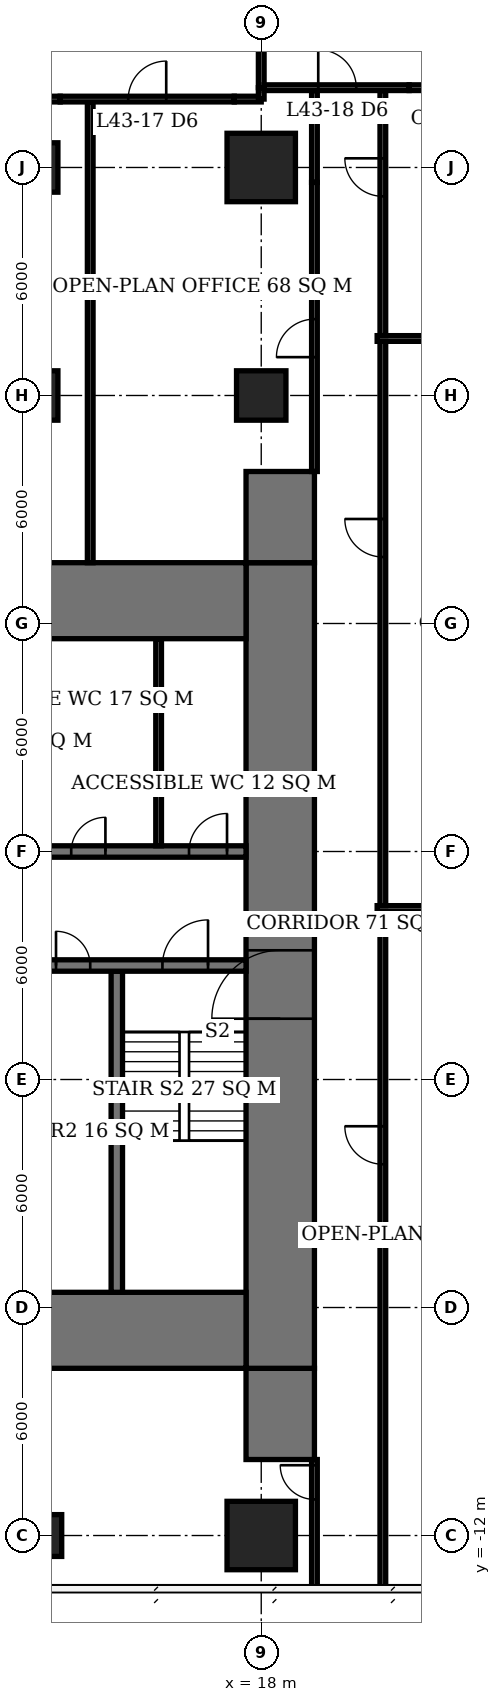
"""IFC4 building model, lengths in metres.
Left out: names, types, materials, properties, quantities, classifications, styles, units other than length and angle.
Written with IfcOpenShell. Run it as: python <this file> out.ifc"""

import sys

from ifc_helpers import new_model, si_unit, direction, frame, frame_2d, origin, origin_2d, place, context, subcontext, project, spatial, rectangle, extrude, element, fill, save


model = new_model("IFC4")
c1 = context("Model", 3, precision=1e-05, world=origin(), true_north=direction((0.0, 1.0)))
c2 = subcontext(c1, "Body", "Model", "MODEL_VIEW")
j1 = project(units=[si_unit("LENGTHUNIT", "METRE"), si_unit("PLANEANGLEUNIT", "RADIAN")], contexts=[c1])
p1 = place(None, origin())
s1 = spatial("IfcSite", under=j1, at=p1, CompositionType="ELEMENT")
p2 = place(p1, origin())
s2 = spatial("IfcBuilding", under=s1, at=p2, CompositionType="ELEMENT")
p3 = place(p2, frame((0.0, 0.0, 177.2)))
s3 = spatial("IfcBuildingStorey", under=s2, at=p3, CompositionType="ELEMENT", Elevation=177.2)
p4 = place(p3, frame((12.0, -12.0, 0.0), z_axis=(0.0, 0.0, 1.0), x_axis=(1.0, 0.0, 0.0)))
e1 = element("IfcColumn", 1, at=p4, inside=s3, PredefinedType="COLUMN", context=c2, shape_type="SweptSolid", body=[
    extrude(rectangle(XDim=1.5, YDim=1.1, at=origin_2d()), origin(), (0.0, 0.0, 1.0), 3.9),
])
for number, where, z_axis, x_axis in (
    (2, (12.0, 18.0, 0.0), (0.0, 0.0, 1.0), (1.0, 0.0, 0.0)),
    (3, (12.0, 24.0, 0.0), (0.0, 0.0, 1.0), (1.0, 0.0, 0.0)),
):
    element("IfcColumn", number, at=place(p3, frame(where, z_axis=z_axis, x_axis=x_axis)), inside=s3, PredefinedType="COLUMN", context=c2, shape_type="SweptSolid", body=[
        extrude(rectangle(XDim=1.3, YDim=1.3, at=origin_2d()), origin(), (0.0, 0.0, 1.0), 3.9),
    ])
p5 = place(p3, frame((18.0, -12.0, 0.0), z_axis=(0.0, 0.0, 1.0), x_axis=(1.0, 0.0, 0.0)))
e4 = element("IfcColumn", 4, at=p5, inside=s3, PredefinedType="COLUMN", context=c2, shape_type="SweptSolid", body=[
    extrude(rectangle(XDim=1.8, YDim=1.8, at=origin_2d()), origin(), (0.0, 0.0, 1.0), 3.9),
])
p6 = place(p3, frame((18.0, 18.0, 0.0), z_axis=(0.0, 0.0, 1.0), x_axis=(1.0, 0.0, 0.0)))
e5 = element("IfcColumn", 5, at=p6, inside=s3, PredefinedType="COLUMN", context=c2, shape_type="SweptSolid", body=[
    extrude(rectangle(XDim=1.3, YDim=1.3, at=origin_2d()), origin(), (0.0, 0.0, 1.0), 3.9),
])
p7 = place(p3, frame((18.0, 24.0, 0.0), z_axis=(0.0, 0.0, 1.0), x_axis=(1.0, 0.0, 0.0)))
e6 = element("IfcColumn", 6, at=p7, inside=s3, PredefinedType="COLUMN", context=c2, shape_type="SweptSolid", body=[
    extrude(rectangle(XDim=1.8, YDim=1.8, at=origin_2d()), origin(), (0.0, 0.0, 1.0), 3.9),
])
for number, where, z_axis, x_axis in (
    (7, (-5.6, -6.6, 0.0), (0.0, 0.0, 1.0), (1.0, 0.0, 0.0)),
    (8, (-5.6, 12.6, 0.0), (0.0, 0.0, 1.0), (1.0, 0.0, 0.0)),
):
    element("IfcWall", number, at=place(p3, frame(where, z_axis=z_axis, x_axis=x_axis)), inside=s3, PredefinedType="SHEAR", context=c2, shape_type="SweptSolid", body=[
        extrude(rectangle(XDim=23.2, YDim=2.0, at=frame_2d((11.6, 0.0))), origin(), (0.0, 0.0, 1.0), 3.9),
    ])
p8 = place(p3, frame((18.5, -7.6, 0.0), z_axis=(0.0, 0.0, 1.0), x_axis=(0.0, 1.0, 0.0)))
e9 = element("IfcWall", 9, at=p8, inside=s3, PredefinedType="SHEAR", context=c2, shape_type="SweptSolid", body=[
    extrude(rectangle(XDim=21.2, YDim=1.8, at=frame_2d((10.6, 0.0))), origin(), (0.0, 0.0, 1.0), 3.9),
])
p9 = place(p8, frame((9.2, 0.0, 0.0)))
e10 = element("IfcOpeningElement", 10, at=p9, cuts=e9, PredefinedType="OPENING", context=c2, shape_type="SweptSolid", body=[
    extrude(rectangle(XDim=1.8, YDim=2.4, at=frame_2d((0.9, 1.2))), frame((0.0, 0.91, 0.0), z_axis=(0.0, -1.0, 0.0), x_axis=(1.0, 0.0, 0.0)), (0.0, 0.0, 1.0), 1.82),
])
for number, where, z_axis, x_axis in (
    (11, (18.5, -10.0, 0.0), (0.0, 0.0, 1.0), (0.0, 1.0, 0.0)),
    (12, (18.5, 13.6, 0.0), (0.0, 0.0, 1.0), (0.0, 1.0, 0.0)),
):
    element("IfcWall", number, at=place(p3, frame(where, z_axis=z_axis, x_axis=x_axis)), inside=s3, PredefinedType="SHEAR", context=c2, shape_type="SweptSolid", body=[
        extrude(rectangle(XDim=2.4, YDim=1.8, at=frame_2d((1.2, 0.0))), origin(), (0.0, 0.0, 1.0), 3.9),
    ])
p10 = place(p3, frame((12.15, 3.0, 0.0), z_axis=(0.0, 0.0, 1.0), x_axis=(1.0, 0.0, 0.0)))
e13 = element("IfcWall", 13, at=p10, inside=s3, PredefinedType="SHEAR", context=c2, shape_type="SweptSolid", body=[
    extrude(rectangle(XDim=5.45, YDim=0.3, at=frame_2d((2.725, 0.0))), origin(), (0.0, 0.0, 1.0), 3.9),
])
p11 = place(p10, frame((3.25, 0.0, 0.0)))
e14 = element("IfcOpeningElement", 14, at=p11, cuts=e13, PredefinedType="OPENING", context=c2, shape_type="SweptSolid", body=[
    extrude(rectangle(XDim=1.2, YDim=2.1, at=frame_2d((0.6, 1.05))), frame((0.0, 0.16, 0.0), z_axis=(0.0, -1.0, 0.0), x_axis=(1.0, 0.0, 0.0)), (0.0, 0.0, 1.0), 0.32),
])
p12 = place(p10, frame((0.45, 0.0, 0.0)))
e15 = element("IfcOpeningElement", 15, at=p12, cuts=e13, PredefinedType="OPENING", context=c2, shape_type="SweptSolid", body=[
    extrude(rectangle(XDim=0.9, YDim=2.1, at=frame_2d((0.45, 1.05))), frame((0.0, 0.16, 0.0), z_axis=(0.0, -1.0, 0.0), x_axis=(1.0, 0.0, 0.0)), (0.0, 0.0, 1.0), 0.32),
])
p13 = place(p3, frame((-0.15, 6.0, 0.0), z_axis=(0.0, 0.0, 1.0), x_axis=(1.0, 0.0, 0.0)))
e16 = element("IfcWall", 16, at=p13, inside=s3, PredefinedType="SHEAR", context=c2, shape_type="SweptSolid", body=[
    extrude(rectangle(XDim=17.75, YDim=0.3, at=frame_2d((8.875, 0.0))), origin(), (0.0, 0.0, 1.0), 3.9),
])
p14 = place(p13, frame((13.15, 0.0, 0.0)))
e17 = element("IfcOpeningElement", 17, at=p14, cuts=e16, PredefinedType="OPENING", context=c2, shape_type="SweptSolid", body=[
    extrude(rectangle(XDim=0.9, YDim=2.1, at=frame_2d((0.45, 1.05))), frame((0.0, 0.16, 0.0), z_axis=(0.0, -1.0, 0.0), x_axis=(1.0, 0.0, 0.0)), (0.0, 0.0, 1.0), 0.32),
])
p15 = place(p13, frame((16.25, 0.0, 0.0)))
e18 = element("IfcOpeningElement", 18, at=p15, cuts=e16, PredefinedType="OPENING", context=c2, shape_type="SweptSolid", body=[
    extrude(rectangle(XDim=1.0, YDim=2.1, at=frame_2d((0.5, 1.05))), frame((0.0, 0.16, 0.0), z_axis=(0.0, -1.0, 0.0), x_axis=(1.0, 0.0, 0.0)), (0.0, 0.0, 1.0), 0.32),
])
p16 = place(p13, frame((7.25, 0.0, 0.0)))
e19 = element("IfcOpeningElement", 19, at=p16, cuts=e16, PredefinedType="OPENING", context=c2, shape_type="SweptSolid", body=[
    extrude(rectangle(XDim=1.0, YDim=2.1, at=frame_2d((0.5, 1.05))), frame((0.0, 0.16, 0.0), z_axis=(0.0, -1.0, 0.0), x_axis=(1.0, 0.0, 0.0)), (0.0, 0.0, 1.0), 0.32),
])
p17 = place(p13, frame((1.1, 0.0, 0.0)))
e20 = element("IfcOpeningElement", 20, at=p17, cuts=e16, PredefinedType="OPENING", context=c2, shape_type="SweptSolid", body=[
    extrude(rectangle(XDim=1.1, YDim=2.1, at=frame_2d((0.55, 1.05))), frame((0.0, 0.16, 0.0), z_axis=(0.0, -1.0, 0.0), x_axis=(1.0, 0.0, 0.0)), (0.0, 0.0, 1.0), 0.32),
])
p18 = place(p13, frame((4.1, 0.0, 0.0)))
e21 = element("IfcOpeningElement", 21, at=p18, cuts=e16, PredefinedType="OPENING", context=c2, shape_type="SweptSolid", body=[
    extrude(rectangle(XDim=1.1, YDim=2.1, at=frame_2d((0.55, 1.05))), frame((0.0, 0.16, 0.0), z_axis=(0.0, -1.0, 0.0), x_axis=(1.0, 0.0, 0.0)), (0.0, 0.0, 1.0), 0.32),
])
p19 = place(p3, frame((14.2, -5.6, 0.0), z_axis=(0.0, 0.0, 1.0), x_axis=(0.0, 1.0, 0.0)))
e22 = element("IfcWall", 22, at=p19, inside=s3, PredefinedType="SHEAR", context=c2, shape_type="SweptSolid", body=[
    extrude(rectangle(XDim=8.45, YDim=0.3, at=frame_2d((4.225, 0.0))), origin(), (0.0, 0.0, 1.0), 3.9),
])
p20 = place(p3, frame((15.3, 6.15, 0.0), z_axis=(0.0, 0.0, 1.0), x_axis=(0.0, 1.0, 0.0)))
e23 = element("IfcWall", 23, at=p20, inside=s3, PredefinedType="PLUMBINGWALL", context=c2, shape_type="SweptSolid", body=[
    extrude(rectangle(XDim=5.45, YDim=0.15, at=frame_2d((2.725, 0.0))), origin(), (0.0, 0.0, 1.0), 3.65),
])
p21 = place(p3, frame((12.0, 25.8, 0.0), z_axis=(0.0, 0.0, 1.0), x_axis=(1.0, 0.0, 0.0)))
e24 = element("IfcWall", 24, at=p21, inside=s3, PredefinedType="PARTITIONING", context=c2, shape_type="SweptSolid", body=[
    extrude(rectangle(XDim=0.71, YDim=0.15, at=frame_2d((0.355, 0.0))), origin(), (0.0, 0.0, 1.0), 2.65),
])
p22 = place(p3, frame((12.71, 25.8, 0.0), z_axis=(0.0, 0.0, 1.0), x_axis=(1.0, 0.0, 0.0)))
e25 = element("IfcWall", 25, at=p22, inside=s3, PredefinedType="PARTITIONING", context=c2, shape_type="SweptSolid", body=[
    extrude(rectangle(XDim=4.58, YDim=0.15, at=frame_2d((2.29, 0.0))), origin(), (0.0, 0.0, 1.0), 3.65),
])
p23 = place(p22, frame((1.79, 0.0, 0.0)))
e26 = element("IfcOpeningElement", 26, at=p23, cuts=e25, PredefinedType="OPENING", context=c2, shape_type="SweptSolid", body=[
    extrude(rectangle(XDim=1.0, YDim=2.1, at=frame_2d((0.5, 1.05))), frame((0.0, 0.085, 0.0), z_axis=(0.0, -1.0, 0.0), x_axis=(1.0, 0.0, 0.0)), (0.0, 0.0, 1.0), 0.17),
])
p24 = place(p3, frame((17.29, 25.8, 0.0), z_axis=(0.0, 0.0, 1.0), x_axis=(1.0, 0.0, 0.0)))
e27 = element("IfcWall", 27, at=p24, inside=s3, PredefinedType="PARTITIONING", context=c2, shape_type="SweptSolid", body=[
    extrude(rectangle(XDim=0.71, YDim=0.15, at=frame_2d((0.355, 0.0))), origin(), (0.0, 0.0, 1.0), 2.65),
])
p25 = place(p3, frame((18.075, 26.1, 0.0), z_axis=(0.0, 0.0, 1.0), x_axis=(1.0, 0.0, 0.0)))
e28 = element("IfcWall", 28, at=p25, inside=s3, PredefinedType="PARTITIONING", context=c2, shape_type="SweptSolid", body=[
    extrude(rectangle(XDim=3.817, YDim=0.15, at=frame_2d((1.909, 0.0))), origin(), (0.0, 0.0, 1.0), 2.65),
])
p26 = place(p25, frame((1.425, 0.0, 0.0)))
e29 = element("IfcOpeningElement", 29, at=p26, cuts=e28, PredefinedType="OPENING", context=c2, shape_type="SweptSolid", body=[
    extrude(rectangle(XDim=1.0, YDim=2.1, at=frame_2d((0.5, 1.05))), frame((0.0, 0.085, 0.0), z_axis=(0.0, -1.0, 0.0), x_axis=(1.0, 0.0, 0.0)), (0.0, 0.0, 1.0), 0.17),
])
p27 = place(p3, frame((21.892, 26.1, 0.0), z_axis=(0.0, 0.0, 1.0), x_axis=(1.0, 0.0, 0.0)))
e30 = element("IfcWall", 30, at=p27, inside=s3, PredefinedType="PARTITIONING", context=c2, shape_type="SweptSolid", body=[
    extrude(rectangle(XDim=1.318, YDim=0.15, at=frame_2d((0.659, 0.0))), origin(), (0.0, 0.0, 1.0), 3.65),
])
p28 = place(p3, frame((18.0, 25.8, 0.0), z_axis=(0.0, 0.0, 1.0), x_axis=(0.0, 1.0, 0.0)))
e31 = element("IfcWall", 31, at=p28, inside=s3, PredefinedType="PARTITIONING", context=c2, shape_type="SweptSolid", body=[
    extrude(rectangle(XDim=0.3, YDim=0.15, at=frame_2d((0.15, 0.0))), origin(), (0.0, 0.0, 1.0), 2.65),
])
p29 = place(p3, frame((18.0, 26.1, 0.0), z_axis=(0.0, 0.0, 1.0), x_axis=(0.0, 1.0, 0.0)))
e32 = element("IfcWall", 32, at=p29, inside=s3, PredefinedType="PARTITIONING", context=c2, shape_type="SweptSolid", body=[
    extrude(rectangle(XDim=2.21, YDim=0.15, at=frame_2d((1.105, 0.0))), origin(), (0.0, 0.0, 1.0), 2.65),
])
p30 = place(p3, frame((13.5, 13.6, 0.0), z_axis=(0.0, 0.0, 1.0), x_axis=(0.0, 1.0, 0.0)))
e33 = element("IfcWall", 33, at=p30, inside=s3, PredefinedType="PARTITIONING", context=c2, shape_type="SweptSolid", body=[
    extrude(rectangle(XDim=12.125, YDim=0.15, at=frame_2d((6.062, 0.0))), origin(), (0.0, 0.0, 1.0), 3.65),
])
p31 = place(p3, frame((19.4, -13.4, 0.0), z_axis=(0.0, 0.0, 1.0), x_axis=(0.0, 1.0, 0.0)))
e34 = element("IfcWall", 34, at=p31, inside=s3, PredefinedType="PARTITIONING", context=c2, shape_type="SweptSolid", body=[
    extrude(rectangle(XDim=3.4, YDim=0.15, at=frame_2d((1.7, 0.0))), origin(), (0.0, 0.0, 1.0), 3.65),
])
p32 = place(p31, frame((2.35, 0.0, 0.0)))
e35 = element("IfcOpeningElement", 35, at=p32, cuts=e34, PredefinedType="OPENING", context=c2, shape_type="SweptSolid", body=[
    extrude(rectangle(XDim=0.9, YDim=2.1, at=frame_2d((0.45, 1.05))), frame((0.0, 0.085, 0.0), z_axis=(0.0, -1.0, 0.0), x_axis=(1.0, 0.0, 0.0)), (0.0, 0.0, 1.0), 0.17),
])
p33 = place(p3, frame((19.4, 16.0, 0.0), z_axis=(0.0, 0.0, 1.0), x_axis=(0.0, 1.0, 0.0)))
e36 = element("IfcWall", 36, at=p33, inside=s3, PredefinedType="PARTITIONING", context=c2, shape_type="SweptSolid", body=[
    extrude(rectangle(XDim=7.608, YDim=0.15, at=frame_2d((3.804, 0.0))), origin(), (0.0, 0.0, 1.0), 3.65),
])
p34 = place(p33, frame((3.009, 0.0, 0.0)))
e37 = element("IfcOpeningElement", 37, at=p34, cuts=e36, PredefinedType="OPENING", context=c2, shape_type="SweptSolid", body=[
    extrude(rectangle(XDim=1.0, YDim=2.1, at=frame_2d((0.5, 1.05))), frame((0.0, 0.085, 0.0), z_axis=(0.0, -1.0, 0.0), x_axis=(1.0, 0.0, 0.0)), (0.0, 0.0, 1.0), 0.17),
])
p35 = place(p3, frame((19.4, 23.608, 0.0), z_axis=(0.0, 0.0, 1.0), x_axis=(0.0, 1.0, 0.0)))
e38 = element("IfcWall", 38, at=p35, inside=s3, PredefinedType="PARTITIONING", context=c2, shape_type="SweptSolid", body=[
    extrude(rectangle(XDim=2.417, YDim=0.15, at=frame_2d((1.208, 0.0))), origin(), (0.0, 0.0, 1.0), 2.65),
])
p36 = place(p3, frame((21.2, -13.4, 0.0), z_axis=(0.0, 0.0, 1.0), x_axis=(0.0, 1.0, 0.0)))
e39 = element("IfcWall", 39, at=p36, inside=s3, PredefinedType="PARTITIONING", context=c2, shape_type="SweptSolid", body=[
    extrude(rectangle(XDim=17.825, YDim=0.15, at=frame_2d((8.913, 0.0))), origin(), (0.0, 0.0, 1.0), 3.65),
])
p37 = place(p36, frame((11.17, 0.0, 0.0)))
e40 = element("IfcOpeningElement", 40, at=p37, cuts=e39, PredefinedType="OPENING", context=c2, shape_type="SweptSolid", body=[
    extrude(rectangle(XDim=1.0, YDim=2.1, at=frame_2d((0.5, 1.05))), frame((0.0, 0.085, 0.0), z_axis=(0.0, -1.0, 0.0), x_axis=(1.0, 0.0, 0.0)), (0.0, 0.0, 1.0), 0.17),
])
p38 = place(p3, frame((21.2, 4.575, 0.0), z_axis=(0.0, 0.0, 1.0), x_axis=(0.0, 1.0, 0.0)))
e41 = element("IfcWall", 41, at=p38, inside=s3, PredefinedType="PARTITIONING", context=c2, shape_type="SweptSolid", body=[
    extrude(rectangle(XDim=14.85, YDim=0.15, at=frame_2d((7.425, 0.0))), origin(), (0.0, 0.0, 1.0), 3.65),
])
p39 = place(p38, frame((9.175, 0.0, 0.0)))
e42 = element("IfcOpeningElement", 42, at=p39, cuts=e41, PredefinedType="OPENING", context=c2, shape_type="SweptSolid", body=[
    extrude(rectangle(XDim=1.0, YDim=2.1, at=frame_2d((0.5, 1.05))), frame((0.0, 0.085, 0.0), z_axis=(0.0, -1.0, 0.0), x_axis=(1.0, 0.0, 0.0)), (0.0, 0.0, 1.0), 0.17),
])
p40 = place(p3, frame((21.05, 4.5, 0.0), z_axis=(0.0, 0.0, 1.0), x_axis=(1.0, 0.0, 0.0)))
e43 = element("IfcWall", 43, at=p40, inside=s3, PredefinedType="PARTITIONING", context=c2, shape_type="SweptSolid", body=[
    extrude(rectangle(XDim=6.54, YDim=0.15, at=frame_2d((3.27, 0.0))), origin(), (0.0, 0.0, 1.0), 3.65),
])
p41 = place(p3, frame((21.2, 19.575, 0.0), z_axis=(0.0, 0.0, 1.0), x_axis=(0.0, 1.0, 0.0)))
e44 = element("IfcWall", 44, at=p41, inside=s3, PredefinedType="PARTITIONING", context=c2, shape_type="SweptSolid", body=[
    extrude(rectangle(XDim=5.833, YDim=0.15, at=frame_2d((2.917, 0.0))), origin(), (0.0, 0.0, 1.0), 3.65),
])
p42 = place(p41, frame((3.666, 0.0, 0.0)))
e45 = element("IfcOpeningElement", 45, at=p42, cuts=e44, PredefinedType="OPENING", context=c2, shape_type="SweptSolid", body=[
    extrude(rectangle(XDim=1.0, YDim=2.1, at=frame_2d((0.5, 1.05))), frame((0.0, 0.085, 0.0), z_axis=(0.0, -1.0, 0.0), x_axis=(1.0, 0.0, 0.0)), (0.0, 0.0, 1.0), 0.17),
])
p43 = place(p3, frame((21.2, 25.408, 0.0), z_axis=(0.0, 0.0, 1.0), x_axis=(0.0, 1.0, 0.0)))
e46 = element("IfcWall", 46, at=p43, inside=s3, PredefinedType="PARTITIONING", context=c2, shape_type="SweptSolid", body=[
    extrude(rectangle(XDim=0.617, YDim=0.15, at=frame_2d((0.309, 0.0))), origin(), (0.0, 0.0, 1.0), 2.65),
])
p44 = place(p3, frame((21.05, 19.5, 0.0), z_axis=(0.0, 0.0, 1.0), x_axis=(1.0, 0.0, 0.0)))
e47 = element("IfcWall", 47, at=p44, inside=s3, PredefinedType="PARTITIONING", context=c2, shape_type="SweptSolid", body=[
    extrude(rectangle(XDim=2.658, YDim=0.15, at=frame_2d((1.329, 0.0))), origin(), (0.0, 0.0, 1.0), 3.65),
])
p45 = place(p9, origin())
e48 = element("IfcDoor", 48, at=p45, inside=s3, OperationType="DOUBLE_DOOR_SINGLE_SWING", PredefinedType="DOOR", context=c2, shape_type="SweptSolid", body=[
    extrude(rectangle(XDim=1.8, YDim=2.4, at=frame_2d((0.9, 1.2))), frame((0.0, 0.025, 0.0), z_axis=(0.0, -1.0, 0.0), x_axis=(1.0, 0.0, 0.0)), (0.0, 0.0, 1.0), 0.05),
])
fill(e10, e48)
p46 = place(p11, origin())
e49 = element("IfcDoor", 49, at=p46, inside=s3, OperationType="SINGLE_SWING_RIGHT", PredefinedType="DOOR", context=c2, shape_type="SweptSolid", body=[
    extrude(rectangle(XDim=1.2, YDim=2.1, at=frame_2d((0.6, 1.05))), frame((0.0, 0.025, 0.0), z_axis=(0.0, -1.0, 0.0), x_axis=(1.0, 0.0, 0.0)), (0.0, 0.0, 1.0), 0.05),
])
fill(e14, e49)
p47 = place(p12, origin())
e50 = element("IfcDoor", 50, at=p47, inside=s3, OperationType="SINGLE_SWING_LEFT", PredefinedType="DOOR", context=c2, shape_type="SweptSolid", body=[
    extrude(rectangle(XDim=0.9, YDim=2.1, at=frame_2d((0.45, 1.05))), frame((0.0, 0.025, 0.0), z_axis=(0.0, -1.0, 0.0), x_axis=(1.0, 0.0, 0.0)), (0.0, 0.0, 1.0), 0.05),
])
fill(e15, e50)
p48 = place(p14, origin())
e51 = element("IfcDoor", 51, at=p48, inside=s3, OperationType="SINGLE_SWING_RIGHT", PredefinedType="DOOR", context=c2, shape_type="SweptSolid", body=[
    extrude(rectangle(XDim=0.9, YDim=2.1, at=frame_2d((0.45, 1.05))), frame((0.0, 0.025, 0.0), z_axis=(0.0, -1.0, 0.0), x_axis=(1.0, 0.0, 0.0)), (0.0, 0.0, 1.0), 0.05),
])
fill(e17, e51)
p49 = place(p15, origin())
e52 = element("IfcDoor", 52, at=p49, inside=s3, OperationType="SINGLE_SWING_RIGHT", PredefinedType="DOOR", context=c2, shape_type="SweptSolid", body=[
    extrude(rectangle(XDim=1.0, YDim=2.1, at=frame_2d((0.5, 1.05))), frame((0.0, 0.025, 0.0), z_axis=(0.0, -1.0, 0.0), x_axis=(1.0, 0.0, 0.0)), (0.0, 0.0, 1.0), 0.05),
])
fill(e18, e52)
p50 = place(p23, origin())
e53 = element("IfcDoor", 53, at=p50, inside=s3, OperationType="SINGLE_SWING_RIGHT", PredefinedType="DOOR", context=c2, shape_type="SweptSolid", body=[
    extrude(rectangle(XDim=1.0, YDim=2.1, at=frame_2d((0.5, 1.05))), frame((0.0, 0.025, 0.0), z_axis=(0.0, -1.0, 0.0), x_axis=(1.0, 0.0, 0.0)), (0.0, 0.0, 1.0), 0.05),
])
fill(e26, e53)
p51 = place(p26, origin())
e54 = element("IfcDoor", 54, at=p51, inside=s3, OperationType="SINGLE_SWING_LEFT", PredefinedType="DOOR", context=c2, shape_type="SweptSolid", body=[
    extrude(rectangle(XDim=1.0, YDim=2.1, at=frame_2d((0.5, 1.05))), frame((0.0, 0.025, 0.0), z_axis=(0.0, -1.0, 0.0), x_axis=(1.0, 0.0, 0.0)), (0.0, 0.0, 1.0), 0.05),
])
fill(e29, e54)
p52 = place(p37, origin())
e55 = element("IfcDoor", 55, at=p52, inside=s3, OperationType="SINGLE_SWING_RIGHT", PredefinedType="DOOR", context=c2, shape_type="SweptSolid", body=[
    extrude(rectangle(XDim=1.0, YDim=2.1, at=frame_2d((0.5, 1.05))), frame((0.0, 0.025, 0.0), z_axis=(0.0, -1.0, 0.0), x_axis=(1.0, 0.0, 0.0)), (0.0, 0.0, 1.0), 0.05),
])
fill(e40, e55)
p53 = place(p39, origin())
e56 = element("IfcDoor", 56, at=p53, inside=s3, OperationType="SINGLE_SWING_RIGHT", PredefinedType="DOOR", context=c2, shape_type="SweptSolid", body=[
    extrude(rectangle(XDim=1.0, YDim=2.1, at=frame_2d((0.5, 1.05))), frame((0.0, 0.025, 0.0), z_axis=(0.0, -1.0, 0.0), x_axis=(1.0, 0.0, 0.0)), (0.0, 0.0, 1.0), 0.05),
])
fill(e42, e56)
p54 = place(p34, origin())
e57 = element("IfcDoor", 57, at=p54, inside=s3, OperationType="SINGLE_SWING_LEFT", PredefinedType="DOOR", context=c2, shape_type="SweptSolid", body=[
    extrude(rectangle(XDim=1.0, YDim=2.1, at=frame_2d((0.5, 1.05))), frame((0.0, 0.025, 0.0), z_axis=(0.0, -1.0, 0.0), x_axis=(1.0, 0.0, 0.0)), (0.0, 0.0, 1.0), 0.05),
])
fill(e37, e57)
p55 = place(p42, origin())
e58 = element("IfcDoor", 58, at=p55, inside=s3, OperationType="SINGLE_SWING_RIGHT", PredefinedType="DOOR", context=c2, shape_type="SweptSolid", body=[
    extrude(rectangle(XDim=1.0, YDim=2.1, at=frame_2d((0.5, 1.05))), frame((0.0, 0.025, 0.0), z_axis=(0.0, -1.0, 0.0), x_axis=(1.0, 0.0, 0.0)), (0.0, 0.0, 1.0), 0.05),
])
fill(e45, e58)
p56 = place(p32, origin())
e59 = element("IfcDoor", 59, at=p56, inside=s3, OperationType="SINGLE_SWING_RIGHT", PredefinedType="DOOR", context=c2, shape_type="SweptSolid", body=[
    extrude(rectangle(XDim=0.9, YDim=2.1, at=frame_2d((0.45, 1.05))), frame((0.0, 0.025, 0.0), z_axis=(0.0, -1.0, 0.0), x_axis=(1.0, 0.0, 0.0)), (0.0, 0.0, 1.0), 0.05),
])
fill(e35, e59)
save(model, sys.argv[1])
